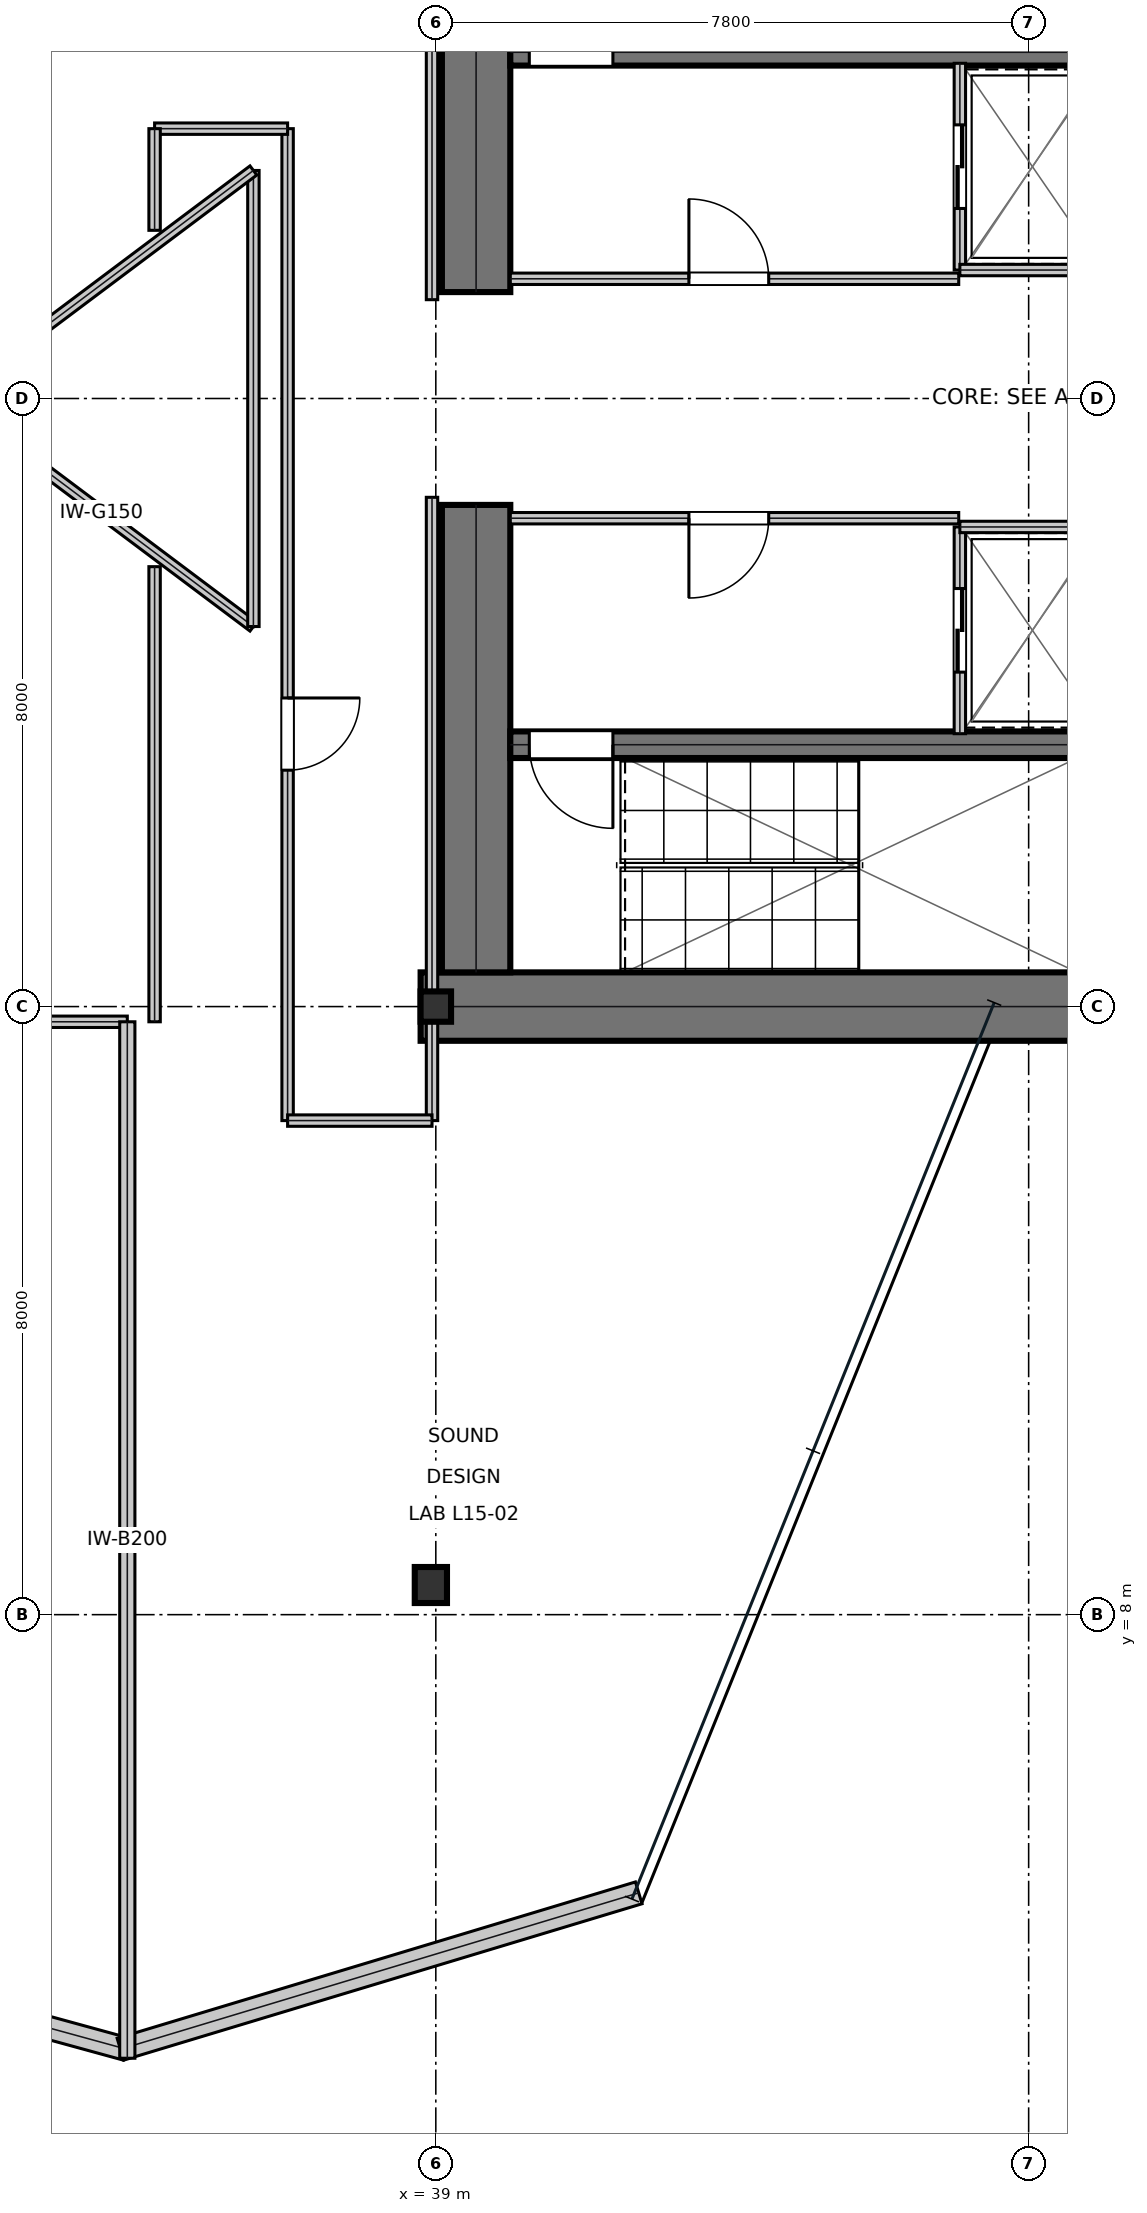
"""IFC4 building model, lengths in metres.
Left out: names, types, materials, properties, quantities, classifications, styles, units other than length and angle.
Written with IfcOpenShell. Run it as: python <this file> out.ifc"""

import sys

from ifc_helpers import new_model, si_unit, direction, frame, frame_2d, origin, origin_2d, place, context, subcontext, project, spatial, rectangle, i_section, extrude, element, fill, save


model = new_model("IFC4")
c1 = context("Model", 3, precision=1e-05, world=origin(), true_north=direction((0.0, 1.0)))
c2 = subcontext(c1, "Body", "Model", "MODEL_VIEW")
j1 = project(units=[si_unit("LENGTHUNIT", "METRE"), si_unit("PLANEANGLEUNIT", "RADIAN")], contexts=[c1])
p1 = place(None, origin())
s1 = spatial("IfcSite", under=j1, at=p1, CompositionType="ELEMENT")
p2 = place(p1, origin())
s2 = spatial("IfcBuilding", under=s1, at=p2, CompositionType="ELEMENT")
p3 = place(p2, frame((0.0, 0.0, 70.2)))
s3 = spatial("IfcBuildingStorey", under=s2, at=p3, CompositionType="ELEMENT", Elevation=70.2)
p4 = place(p3, frame((38.8, 16.0, 0.0), z_axis=(0.0, 0.0, 1.0), x_axis=(1.0, 0.0, 0.0)))
e1 = element("IfcWall", 1, at=p4, inside=s3, PredefinedType="SHEAR", context=c2, shape_type="SweptSolid", body=[
    extrude(rectangle(XDim=16.0, YDim=0.9, at=frame_2d((8.0, 0.0))), origin(), (0.0, 0.0, 1.0), 3.81),
])
for number, where, z_axis, x_axis in (
    (2, (39.53, 16.45, 0.0), (0.0, 0.0, 1.0), (0.0, 1.0, 0.0)),
    (3, (39.53, 25.4, 0.0), (0.0, 0.0, 1.0), (0.0, 1.0, 0.0)),
):
    element("IfcWall", number, at=place(p3, frame(where, z_axis=z_axis, x_axis=x_axis)), inside=s3, PredefinedType="SHEAR", context=c2, shape_type="SweptSolid", body=[
        extrude(rectangle(XDim=6.15, YDim=0.9, at=frame_2d((3.075, 0.0))), origin(), (0.0, 0.0, 1.0), 3.81),
    ])
p5 = place(p3, frame((39.98, 28.555, 0.0), z_axis=(0.0, 0.0, 1.0), x_axis=(1.0, 0.0, 0.0)))
e4 = element("IfcWall", 4, at=p5, inside=s3, PredefinedType="SHEAR", context=c2, shape_type="SweptSolid", body=[
    extrude(rectangle(XDim=7.71, YDim=0.35, at=frame_2d((3.855, 0.0))), origin(), (0.0, 0.0, 1.0), 3.81),
])
p6 = place(p5, frame((0.25, 0.0, 0.0)))
e5 = element("IfcOpeningElement", 5, at=p6, cuts=e4, PredefinedType="OPENING", context=c2, shape_type="SweptSolid", body=[
    extrude(rectangle(XDim=1.1, YDim=2.15, at=frame_2d((0.55, 1.075))), frame((0.0, 0.185, 0.0), z_axis=(0.0, -1.0, 0.0), x_axis=(1.0, 0.0, 0.0)), (0.0, 0.0, 1.0), 0.37),
])
p7 = place(p3, frame((39.98, 19.445, 0.0), z_axis=(0.0, 0.0, 1.0), x_axis=(1.0, 0.0, 0.0)))
e6 = element("IfcWall", 6, at=p7, inside=s3, PredefinedType="SHEAR", context=c2, shape_type="SweptSolid", body=[
    extrude(rectangle(XDim=7.71, YDim=0.35, at=frame_2d((3.855, 0.0))), origin(), (0.0, 0.0, 1.0), 3.81),
])
p8 = place(p7, frame((0.25, 0.0, 0.0)))
e7 = element("IfcOpeningElement", 7, at=p8, cuts=e6, PredefinedType="OPENING", context=c2, shape_type="SweptSolid", body=[
    extrude(rectangle(XDim=1.1, YDim=2.15, at=frame_2d((0.55, 1.075))), frame((0.0, 0.185, 0.0), z_axis=(0.0, -1.0, 0.0), x_axis=(1.0, 0.0, 0.0)), (0.0, 0.0, 1.0), 0.37),
])
p9 = place(p3, frame((39.0, 16.0, 0.0), z_axis=(0.0, 0.0, 1.0), x_axis=(1.0, 0.0, 0.0)))
e8 = element("IfcColumn", 8, at=p9, inside=s3, PredefinedType="COLUMN", context=c2, shape_type="SweptSolid", body=[
    extrude(i_section(OverallWidth=0.401, OverallDepth=0.399, WebThickness=0.025, FlangeThickness=0.04, at=origin_2d()), origin(), (0.0, 0.0, 1.0), 4.044),
])
p10 = place(p3, frame((38.935, 8.39, 0.016), z_axis=(-0.006254246892, 0.037343318823, 0.999282923368), x_axis=(-0.986263587143, -0.165179104839, 0.0)))
e9 = element("IfcColumn", 9, at=p10, inside=s3, PredefinedType="COLUMN", context=c2, shape_type="SweptSolid", body=[
    extrude(i_section(OverallWidth=0.424, OverallDepth=0.474, WebThickness=0.048, FlangeThickness=0.077, at=origin_2d()), origin(), (0.0, 0.0, 1.0), 4.021),
])
p11 = place(p3, frame((28.109, 4.154, 0.0), z_axis=(0.0, 0.0, 1.0), x_axis=(0.96439075506, -0.264481514581, 0.0)))
e10 = element("IfcWall", 10, at=p11, inside=s3, PredefinedType="STANDARD", context=c2, shape_type="SweptSolid", body=[
    extrude(rectangle(XDim=7.071, YDim=0.3, at=frame_2d((3.535, 0.0))), origin(), (0.0, 0.0, 1.0), 3.81),
])
p12 = place(p3, frame((34.851, 2.283, 0.0), z_axis=(0.0, 0.0, 1.0), x_axis=(0.957387451844, 0.288806625707, 0.0)))
e11 = element("IfcWall", 11, at=p12, inside=s3, PredefinedType="STANDARD", context=c2, shape_type="SweptSolid", body=[
    extrude(rectangle(XDim=7.123, YDim=0.3, at=frame_2d((3.562, 0.0))), origin(), (0.0, 0.0, 1.0), 3.81),
])
p13 = place(p3, frame((39.98, 25.575, 0.0), z_axis=(0.0, 0.0, 1.0), x_axis=(1.0, 0.0, 0.0)))
e12 = element("IfcWall", 12, at=p13, inside=s3, PredefinedType="PARTITIONING", context=c2, shape_type="SweptSolid", body=[
    extrude(rectangle(XDim=5.9, YDim=0.15, at=frame_2d((2.95, 0.0))), origin(), (0.0, 0.0, 1.0), 3.81),
])
p14 = place(p13, frame((2.35, 0.0, 0.0)))
e13 = element("IfcOpeningElement", 13, at=p14, cuts=e12, PredefinedType="OPENING", context=c2, shape_type="SweptSolid", body=[
    extrude(rectangle(XDim=1.05, YDim=2.15, at=frame_2d((0.525, 1.075))), frame((0.0, 0.085, 0.0), z_axis=(0.0, -1.0, 0.0), x_axis=(1.0, 0.0, 0.0)), (0.0, 0.0, 1.0), 0.17),
])
p15 = place(p3, frame((39.98, 22.425, 0.0), z_axis=(0.0, 0.0, 1.0), x_axis=(1.0, 0.0, 0.0)))
e14 = element("IfcWall", 14, at=p15, inside=s3, PredefinedType="PARTITIONING", context=c2, shape_type="SweptSolid", body=[
    extrude(rectangle(XDim=5.9, YDim=0.15, at=frame_2d((2.95, 0.0))), origin(), (0.0, 0.0, 1.0), 3.81),
])
p16 = place(p15, frame((2.35, 0.0, 0.0)))
e15 = element("IfcOpeningElement", 15, at=p16, cuts=e14, PredefinedType="OPENING", context=c2, shape_type="SweptSolid", body=[
    extrude(rectangle(XDim=1.05, YDim=2.15, at=frame_2d((0.525, 1.075))), frame((0.0, 0.085, 0.0), z_axis=(0.0, -1.0, 0.0), x_axis=(1.0, 0.0, 0.0)), (0.0, 0.0, 1.0), 0.17),
])
p17 = place(p3, frame((45.895, 25.69, 0.0), z_axis=(0.0, 0.0, 1.0), x_axis=(0.0, 1.0, 0.0)))
e16 = element("IfcWall", 16, at=p17, inside=s3, PredefinedType="PARTITIONING", context=c2, shape_type="SweptSolid", body=[
    extrude(rectangle(XDim=2.72, YDim=0.15, at=frame_2d((1.36, 0.0))), origin(), (0.0, 0.0, 1.0), 3.81),
])
p18 = place(p17, frame((0.81, 0.0, 0.0)))
e17 = element("IfcOpeningElement", 17, at=p18, cuts=e16, PredefinedType="OPENING", context=c2, shape_type="SweptSolid", body=[
    extrude(rectangle(XDim=1.1, YDim=2.15, at=frame_2d((0.55, 1.075))), frame((0.0, 0.085, 0.0), z_axis=(0.0, -1.0, 0.0), x_axis=(1.0, 0.0, 0.0)), (0.0, 0.0, 1.0), 0.17),
])
p19 = place(p3, frame((45.895, 25.69, 0.0), z_axis=(0.0, 0.0, 1.0), x_axis=(1.0, 0.0, 0.0)))
e18 = element("IfcWall", 18, at=p19, inside=s3, PredefinedType="PARTITIONING", context=c2, shape_type="SweptSolid", body=[
    extrude(rectangle(XDim=1.915, YDim=0.15, at=frame_2d((0.958, 0.0))), origin(), (0.0, 0.0, 1.0), 3.81),
])
p20 = place(p3, frame((45.895, 19.59, 0.0), z_axis=(0.0, 0.0, 1.0), x_axis=(0.0, 1.0, 0.0)))
e19 = element("IfcWall", 19, at=p20, inside=s3, PredefinedType="PARTITIONING", context=c2, shape_type="SweptSolid", body=[
    extrude(rectangle(XDim=2.72, YDim=0.15, at=frame_2d((1.36, 0.0))), origin(), (0.0, 0.0, 1.0), 3.81),
])
p21 = place(p20, frame((0.81, 0.0, 0.0)))
e20 = element("IfcOpeningElement", 20, at=p21, cuts=e19, PredefinedType="OPENING", context=c2, shape_type="SweptSolid", body=[
    extrude(rectangle(XDim=1.1, YDim=2.15, at=frame_2d((0.55, 1.075))), frame((0.0, 0.085, 0.0), z_axis=(0.0, -1.0, 0.0), x_axis=(1.0, 0.0, 0.0)), (0.0, 0.0, 1.0), 0.17),
])
p22 = place(p3, frame((45.895, 22.31, 0.0), z_axis=(0.0, 0.0, 1.0), x_axis=(1.0, 0.0, 0.0)))
e21 = element("IfcWall", 21, at=p22, inside=s3, PredefinedType="PARTITIONING", context=c2, shape_type="SweptSolid", body=[
    extrude(rectangle(XDim=1.915, YDim=0.15, at=frame_2d((0.958, 0.0))), origin(), (0.0, 0.0, 1.0), 3.81),
])
p23 = place(p3, frame((37.05, 14.5, 0.0), z_axis=(0.0, 0.0, 1.0), x_axis=(0.0, 1.0, 0.0)))
e22 = element("IfcWall", 22, at=p23, inside=s3, PredefinedType="PARTITIONING", context=c2, shape_type="SweptSolid", body=[
    extrude(rectangle(XDim=13.05, YDim=0.15, at=frame_2d((6.525, 0.0))), origin(), (0.0, 0.0, 1.0), 3.181),
])
p24 = place(p23, frame((4.61, 0.0, 0.0)))
e23 = element("IfcOpeningElement", 23, at=p24, cuts=e22, PredefinedType="OPENING", context=c2, shape_type="SweptSolid", body=[
    extrude(rectangle(XDim=0.95, YDim=2.15, at=frame_2d((0.475, 1.075))), frame((0.0, 0.085, 0.0), z_axis=(0.0, -1.0, 0.0), x_axis=(1.0, 0.0, 0.0)), (0.0, 0.0, 1.0), 0.17),
])
p25 = place(p3, frame((33.4, 15.8, 0.0), z_axis=(0.0, 0.0, 1.0), x_axis=(1.0, 0.0, 0.0)))
e24 = element("IfcWall", 24, at=p25, inside=s3, PredefinedType="PARTITIONING", context=c2, shape_type="SweptSolid", body=[
    extrude(rectangle(XDim=1.541, YDim=0.15, at=frame_2d((0.771, 0.0))), origin(), (0.0, 0.0, 1.0), 3.181),
])
p26 = place(p3, frame((38.95, 14.5, 0.0), z_axis=(0.0, 0.0, 1.0), x_axis=(0.0, 1.0, 0.0)))
e25 = element("IfcWall", 25, at=p26, inside=s3, PredefinedType="PARTITIONING", context=c2, shape_type="SweptSolid", body=[
    extrude(rectangle(XDim=8.2, YDim=0.15, at=frame_2d((4.1, 0.0))), origin(), (0.0, 0.0, 1.0), 3.181),
])
p27 = place(p3, frame((35.3, 15.8, 0.0), z_axis=(0.0, 0.0, 1.0), x_axis=(0.0, 1.0, 0.0)))
e26 = element("IfcWall", 26, at=p27, inside=s3, PredefinedType="PARTITIONING", context=c2, shape_type="SweptSolid", body=[
    extrude(rectangle(XDim=5.988, YDim=0.15, at=frame_2d((2.994, 0.0))), origin(), (0.0, 0.0, 1.0), 3.181),
])
p28 = place(p3, frame((37.05, 14.5, 0.0), z_axis=(0.0, 0.0, 1.0), x_axis=(1.0, 0.0, 0.0)))
e27 = element("IfcWall", 27, at=p28, inside=s3, PredefinedType="PARTITIONING", context=c2, shape_type="SweptSolid", body=[
    extrude(rectangle(XDim=1.9, YDim=0.15, at=frame_2d((0.95, 0.0))), origin(), (0.0, 0.0, 1.0), 3.81),
])
p29 = place(p3, frame((35.3, 27.55, 0.0), z_axis=(0.0, 0.0, 1.0), x_axis=(1.0, 0.0, 0.0)))
e28 = element("IfcWall", 28, at=p29, inside=s3, PredefinedType="PARTITIONING", context=c2, shape_type="SweptSolid", body=[
    extrude(rectangle(XDim=1.75, YDim=0.15, at=frame_2d((0.875, 0.0))), origin(), (0.0, 0.0, 1.0), 3.391),
])
p30 = place(p3, frame((35.3, 26.212, 0.0), z_axis=(0.0, 0.0, 1.0), x_axis=(0.0, 1.0, 0.0)))
e29 = element("IfcWall", 29, at=p30, inside=s3, PredefinedType="PARTITIONING", context=c2, shape_type="SweptSolid", body=[
    extrude(rectangle(XDim=1.338, YDim=0.15, at=frame_2d((0.669, 0.0))), origin(), (0.0, 0.0, 1.0), 3.81),
])
p31 = place(p3, frame((38.95, 25.3, 0.0), z_axis=(0.0, 0.0, 1.0), x_axis=(0.0, 1.0, 0.0)))
e30 = element("IfcWall", 30, at=p31, inside=s3, PredefinedType="PARTITIONING", context=c2, shape_type="SweptSolid", body=[
    extrude(rectangle(XDim=8.2, YDim=0.15, at=frame_2d((4.1, 0.0))), origin(), (0.0, 0.0, 1.0), 3.181),
])
p32 = place(p3, frame((34.941, 2.164, 0.0), z_axis=(0.0, 0.0, 1.0), x_axis=(0.0, 1.0, 0.0)))
e31 = element("IfcWall", 31, at=p32, inside=s3, PredefinedType="SOLIDWALL", context=c2, shape_type="SweptSolid", body=[
    extrude(rectangle(XDim=13.636, YDim=0.2, at=frame_2d((6.818, 0.0))), origin(), (0.0, 0.0, 1.0), 3.338),
])
p33 = place(p3, frame((32.6, 24.0, 0.0), z_axis=(0.0, 0.0, 1.0), x_axis=(0.8, -0.6, 0.0)))
e32 = element("IfcWall", 32, at=p33, inside=s3, PredefinedType="MOVABLE", context=c2, shape_type="SweptSolid", body=[
    extrude(rectangle(XDim=5.0, YDim=0.15, at=frame_2d((2.5, 0.0))), origin(), (0.0, 0.0, 1.0), 3.81),
])
p34 = place(p3, frame((36.6, 21.0, 0.0), z_axis=(0.0, 0.0, 1.0), x_axis=(0.0, 1.0, 0.0)))
e33 = element("IfcWall", 33, at=p34, inside=s3, PredefinedType="MOVABLE", context=c2, shape_type="SweptSolid", body=[
    extrude(rectangle(XDim=6.0, YDim=0.15, at=frame_2d((3.0, 0.0))), origin(), (0.0, 0.0, 1.0), 3.81),
])
p35 = place(p3, frame((36.6, 27.0, 0.0), z_axis=(0.0, 0.0, 1.0), x_axis=(-0.8, -0.6, 0.0)))
e34 = element("IfcWall", 34, at=p35, inside=s3, PredefinedType="MOVABLE", context=c2, shape_type="SweptSolid", body=[
    extrude(rectangle(XDim=5.0, YDim=0.15, at=frame_2d((2.5, 0.0))), origin(), (0.0, 0.0, 1.0), 3.81),
])
p36 = place(p14, origin())
e35 = element("IfcDoor", 35, at=p36, inside=s3, OperationType="SINGLE_SWING_LEFT", PredefinedType="DOOR", context=c2, shape_type="SweptSolid", body=[
    extrude(rectangle(XDim=1.05, YDim=2.15, at=frame_2d((0.525, 1.075))), frame((0.0, 0.025, 0.0), z_axis=(0.0, -1.0, 0.0), x_axis=(1.0, 0.0, 0.0)), (0.0, 0.0, 1.0), 0.05),
])
fill(e13, e35)
p37 = place(p16, frame((1.05, 0.0, 0.0), z_axis=(0.0, 0.0, 1.0), x_axis=(-1.0, 0.0, 0.0)))
e36 = element("IfcDoor", 36, at=p37, inside=s3, OperationType="SINGLE_SWING_RIGHT", PredefinedType="DOOR", context=c2, shape_type="SweptSolid", body=[
    extrude(rectangle(XDim=1.05, YDim=2.15, at=frame_2d((0.525, 1.075))), frame((0.0, 0.025, 0.0), z_axis=(0.0, -1.0, 0.0), x_axis=(1.0, 0.0, 0.0)), (0.0, 0.0, 1.0), 0.05),
])
fill(e15, e36)
p38 = place(p18, frame((1.1, 0.0, 0.0), z_axis=(0.0, 0.0, 1.0), x_axis=(-1.0, 0.0, 0.0)))
e37 = element("IfcDoor", 37, at=p38, inside=s3, OperationType="DOUBLE_DOOR_SLIDING", PredefinedType="DOOR", context=c2, shape_type="SweptSolid", body=[
    extrude(rectangle(XDim=1.1, YDim=2.15, at=frame_2d((0.55, 1.075))), frame((0.0, 0.025, 0.0), z_axis=(0.0, -1.0, 0.0), x_axis=(1.0, 0.0, 0.0)), (0.0, 0.0, 1.0), 0.05),
])
fill(e17, e37)
p39 = place(p21, frame((1.1, 0.0, 0.0), z_axis=(0.0, 0.0, 1.0), x_axis=(-1.0, 0.0, 0.0)))
e38 = element("IfcDoor", 38, at=p39, inside=s3, OperationType="DOUBLE_DOOR_SLIDING", PredefinedType="DOOR", context=c2, shape_type="SweptSolid", body=[
    extrude(rectangle(XDim=1.1, YDim=2.15, at=frame_2d((0.55, 1.075))), frame((0.0, 0.025, 0.0), z_axis=(0.0, -1.0, 0.0), x_axis=(1.0, 0.0, 0.0)), (0.0, 0.0, 1.0), 0.05),
])
fill(e20, e38)
p40 = place(p24, frame((0.95, 0.0, 0.0), z_axis=(0.0, 0.0, 1.0), x_axis=(-1.0, 0.0, 0.0)))
e39 = element("IfcDoor", 39, at=p40, inside=s3, OperationType="SINGLE_SWING_LEFT", PredefinedType="DOOR", context=c2, shape_type="SweptSolid", body=[
    extrude(rectangle(XDim=0.95, YDim=2.15, at=frame_2d((0.475, 1.075))), frame((0.0, 0.025, 0.0), z_axis=(0.0, -1.0, 0.0), x_axis=(1.0, 0.0, 0.0)), (0.0, 0.0, 1.0), 0.05),
])
fill(e23, e39)
p41 = place(p6, origin())
e40 = element("IfcDoor", 40, at=p41, inside=s3, OperationType="SINGLE_SWING_RIGHT", PredefinedType="DOOR", context=c2, shape_type="SweptSolid", body=[
    extrude(rectangle(XDim=1.1, YDim=2.15, at=frame_2d((0.55, 1.075))), frame((0.0, 0.025, 0.0), z_axis=(0.0, -1.0, 0.0), x_axis=(1.0, 0.0, 0.0)), (0.0, 0.0, 1.0), 0.05),
])
fill(e5, e40)
p42 = place(p8, frame((1.1, 0.0, 0.0), z_axis=(0.0, 0.0, 1.0), x_axis=(-1.0, 0.0, 0.0)))
e41 = element("IfcDoor", 41, at=p42, inside=s3, OperationType="SINGLE_SWING_LEFT", PredefinedType="DOOR", context=c2, shape_type="SweptSolid", body=[
    extrude(rectangle(XDim=1.1, YDim=2.15, at=frame_2d((0.55, 1.075))), frame((0.0, 0.025, 0.0), z_axis=(0.0, -1.0, 0.0), x_axis=(1.0, 0.0, 0.0)), (0.0, 0.0, 1.0), 0.05),
])
fill(e7, e41)
save(model, sys.argv[1])
